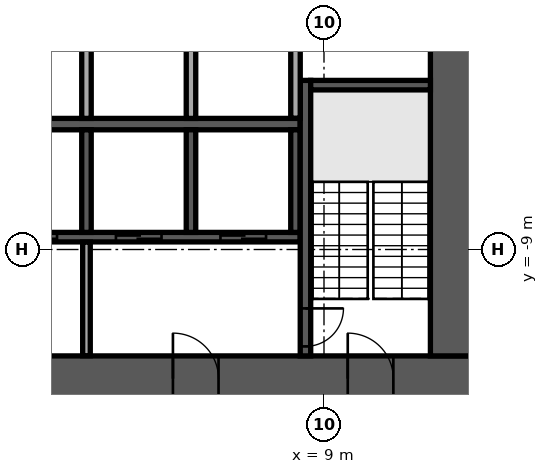
"""IFC4 building model, lengths in metres.
Left out: names, types, materials, properties, quantities, classifications, styles, units other than length and angle.
Written with IfcOpenShell. Run it as: python <this file> out.ifc"""

import sys

from ifc_helpers import new_model, si_unit, direction, frame, frame_2d, origin, place, context, subcontext, project, spatial, rectangle, extrude, element, fill, save


model = new_model("IFC4")
c1 = context("Model", 3, precision=1e-05, world=origin(), true_north=direction((0.0, 1.0)))
c2 = subcontext(c1, "Body", "Model", "MODEL_VIEW")
j1 = project(units=[si_unit("LENGTHUNIT", "METRE"), si_unit("PLANEANGLEUNIT", "RADIAN")], contexts=[c1])
p1 = place(None, origin())
s1 = spatial("IfcSite", under=j1, at=p1, CompositionType="ELEMENT")
p2 = place(p1, origin())
s2 = spatial("IfcBuilding", under=s1, at=p2, CompositionType="ELEMENT")
p3 = place(p2, frame((0.0, 0.0, 51.3)))
s3 = spatial("IfcBuildingStorey", under=s2, at=p3, CompositionType="ELEMENT", Elevation=51.3)
p4 = place(p3, frame((-13.0, -12.4, 0.0), z_axis=(0.0, 0.0, 1.0), x_axis=(1.0, 0.0, 0.0)))
e1 = element("IfcWall", 1, at=p4, inside=s3, PredefinedType="SHEAR", context=c2, shape_type="SweptSolid", body=[
    extrude(rectangle(XDim=26.0, YDim=1.2, at=frame_2d((13.0, 0.0))), origin(), (0.0, 0.0, 1.0), 3.75),
])
p5 = place(p4, frame((7.9, 0.0, 0.0)))
e2 = element("IfcOpeningElement", 2, at=p5, cuts=e1, PredefinedType="OPENING", context=c2, shape_type="SweptSolid", body=[
    extrude(rectangle(XDim=2.0, YDim=2.1, at=frame_2d((1.0, 1.05))), frame((0.0, 0.61, 0.0), z_axis=(0.0, -1.0, 0.0), x_axis=(1.0, 0.0, 0.0)), (0.0, 0.0, 1.0), 1.22),
])
p6 = place(p4, frame((18.025, 0.0, 0.0)))
e3 = element("IfcOpeningElement", 3, at=p6, cuts=e1, PredefinedType="OPENING", context=c2, shape_type="SweptSolid", body=[
    extrude(rectangle(XDim=1.2, YDim=2.1, at=frame_2d((0.6, 1.05))), frame((0.0, 0.61, 0.0), z_axis=(0.0, -1.0, 0.0), x_axis=(1.0, 0.0, 0.0)), (0.0, 0.0, 1.0), 1.22),
])
p7 = place(p4, frame((2.175, 0.0, 0.0)))
e4 = element("IfcOpeningElement", 4, at=p7, cuts=e1, PredefinedType="OPENING", context=c2, shape_type="SweptSolid", body=[
    extrude(rectangle(XDim=1.2, YDim=2.1, at=frame_2d((0.6, 1.05))), frame((0.0, 0.61, 0.0), z_axis=(0.0, -1.0, 0.0), x_axis=(1.0, 0.0, 0.0)), (0.0, 0.0, 1.0), 1.22),
])
p8 = place(p4, frame((22.625, 0.0, 0.0)))
e5 = element("IfcOpeningElement", 5, at=p8, cuts=e1, PredefinedType="OPENING", context=c2, shape_type="SweptSolid", body=[
    extrude(rectangle(XDim=1.2, YDim=2.1, at=frame_2d((0.6, 1.05))), frame((0.0, 0.61, 0.0), z_axis=(0.0, -1.0, 0.0), x_axis=(1.0, 0.0, 0.0)), (0.0, 0.0, 1.0), 1.22),
])
p9 = place(p3, frame((12.4, -11.8, 0.0), z_axis=(0.0, 0.0, 1.0), x_axis=(0.0, 1.0, 0.0)))
e6 = element("IfcWall", 6, at=p9, inside=s3, PredefinedType="SHEAR", context=c2, shape_type="SweptSolid", body=[
    extrude(rectangle(XDim=23.6, YDim=1.2, at=frame_2d((11.8, 0.0))), origin(), (0.0, 0.0, 1.0), 3.75),
])
p10 = place(p9, frame((10.6, 0.0, 0.0)))
e7 = element("IfcOpeningElement", 7, at=p10, cuts=e6, PredefinedType="OPENING", context=c2, shape_type="SweptSolid", body=[
    extrude(rectangle(XDim=2.4, YDim=2.4, at=frame_2d((1.2, 1.2))), frame((0.0, 0.61, 0.0), z_axis=(0.0, -1.0, 0.0), x_axis=(1.0, 0.0, 0.0)), (0.0, 0.0, 1.0), 1.22),
])
p11 = place(p3, frame((-8.375, -5.7, 0.0), z_axis=(0.0, 0.0, 1.0), x_axis=(1.0, 0.0, 0.0)))
e8 = element("IfcWall", 8, at=p11, inside=s3, PredefinedType="SOLIDWALL", context=c2, shape_type="SweptSolid", body=[
    extrude(rectangle(XDim=16.75, YDim=0.3, at=frame_2d((8.375, 0.0))), origin(), (0.0, 0.0, 1.0), 3.75),
])
for number, where, z_axis, x_axis in (
    (9, (2.75, -5.55, 0.0), (0.0, 0.0, 1.0), (0.0, 1.0, 0.0)),
    (10, (5.5, -5.55, 0.0), (0.0, 0.0, 1.0), (0.0, 1.0, 0.0)),
):
    element("IfcWall", number, at=place(p3, frame(where, z_axis=z_axis, x_axis=x_axis)), inside=s3, PredefinedType="SOLIDWALL", context=c2, shape_type="SweptSolid", body=[
        extrude(rectangle(XDim=2.7, YDim=0.25, at=frame_2d((1.35, 0.0))), origin(), (0.0, 0.0, 1.0), 3.75),
    ])
p12 = place(p3, frame((-2.875, -8.675, 0.0), z_axis=(0.0, 0.0, 1.0), x_axis=(1.0, 0.0, 0.0)))
e11 = element("IfcWall", 11, at=p12, inside=s3, PredefinedType="SOLIDWALL", context=c2, shape_type="SweptSolid", body=[
    extrude(rectangle(XDim=11.25, YDim=0.25, at=frame_2d((5.625, 0.0))), origin(), (0.0, 0.0, 1.0), 3.75),
])
p13 = place(p12, frame((0.9, 0.0, 0.0)))
e12 = element("IfcOpeningElement", 12, at=p13, cuts=e11, PredefinedType="OPENING", context=c2, shape_type="SweptSolid", body=[
    extrude(rectangle(XDim=1.2, YDim=2.1, at=frame_2d((0.6, 1.05))), frame((0.0, 0.135, 0.0), z_axis=(0.0, -1.0, 0.0), x_axis=(1.0, 0.0, 0.0)), (0.0, 0.0, 1.0), 0.27),
])
p14 = place(p12, frame((3.65, 0.0, 0.0)))
e13 = element("IfcOpeningElement", 13, at=p14, cuts=e11, PredefinedType="OPENING", context=c2, shape_type="SweptSolid", body=[
    extrude(rectangle(XDim=1.2, YDim=2.1, at=frame_2d((0.6, 1.05))), frame((0.0, 0.135, 0.0), z_axis=(0.0, -1.0, 0.0), x_axis=(1.0, 0.0, 0.0)), (0.0, 0.0, 1.0), 0.27),
])
p15 = place(p12, frame((6.4, 0.0, 0.0)))
e14 = element("IfcOpeningElement", 14, at=p15, cuts=e11, PredefinedType="OPENING", context=c2, shape_type="SweptSolid", body=[
    extrude(rectangle(XDim=1.2, YDim=2.1, at=frame_2d((0.6, 1.05))), frame((0.0, 0.135, 0.0), z_axis=(0.0, -1.0, 0.0), x_axis=(1.0, 0.0, 0.0)), (0.0, 0.0, 1.0), 0.27),
])
p16 = place(p12, frame((9.15, 0.0, 0.0)))
e15 = element("IfcOpeningElement", 15, at=p16, cuts=e11, PredefinedType="OPENING", context=c2, shape_type="SweptSolid", body=[
    extrude(rectangle(XDim=1.2, YDim=2.1, at=frame_2d((0.6, 1.05))), frame((0.0, 0.135, 0.0), z_axis=(0.0, -1.0, 0.0), x_axis=(1.0, 0.0, 0.0)), (0.0, 0.0, 1.0), 0.27),
])
for number, where, z_axis, x_axis in (
    (16, (2.75, -8.55, 0.0), (0.0, 0.0, 1.0), (0.0, 1.0, 0.0)),
    (17, (5.5, -8.55, 0.0), (0.0, 0.0, 1.0), (0.0, 1.0, 0.0)),
    (18, (8.25, -8.55, 0.0), (0.0, 0.0, 1.0), (0.0, 1.0, 0.0)),
):
    element("IfcWall", number, at=place(p3, frame(where, z_axis=z_axis, x_axis=x_axis)), inside=s3, PredefinedType="SOLIDWALL", context=c2, shape_type="SweptSolid", body=[
        extrude(rectangle(XDim=2.7, YDim=0.25, at=frame_2d((1.35, 0.0))), origin(), (0.0, 0.0, 1.0), 3.75),
    ])
p17 = place(p3, frame((8.512, -4.55, 0.0), z_axis=(0.0, 0.0, 1.0), x_axis=(0.0, -1.0, 0.0)))
e19 = element("IfcWall", 19, at=p17, inside=s3, PredefinedType="SOLIDWALL", context=c2, shape_type="SweptSolid", body=[
    extrude(rectangle(XDim=7.25, YDim=0.275, at=frame_2d((3.625, 0.0))), origin(), (0.0, 0.0, 1.0), 3.75),
])
p18 = place(p17, frame((6.0, 0.0, 0.0)))
e20 = element("IfcOpeningElement", 20, at=p18, cuts=e19, PredefinedType="OPENING", context=c2, shape_type="SweptSolid", body=[
    extrude(rectangle(XDim=1.0, YDim=2.1, at=frame_2d((0.5, 1.05))), frame((0.0, 0.147, 0.0), z_axis=(0.0, -1.0, 0.0), x_axis=(1.0, 0.0, 0.0)), (0.0, 0.0, 1.0), 0.295),
])
p19 = place(p3, frame((8.65, -4.675, 0.0), z_axis=(0.0, 0.0, 1.0), x_axis=(1.0, 0.0, 0.0)))
e21 = element("IfcWall", 21, at=p19, inside=s3, PredefinedType="SOLIDWALL", context=c2, shape_type="SweptSolid", body=[
    extrude(rectangle(XDim=3.15, YDim=0.25, at=frame_2d((1.575, 0.0))), origin(), (0.0, 0.0, 1.0), 3.75),
])
p20 = place(p3, frame((2.75, -11.795, 0.0), z_axis=(0.0, 0.0, 1.0), x_axis=(0.0, 1.0, 0.0)))
e22 = element("IfcWall", 22, at=p20, inside=s3, PredefinedType="PARTITIONING", context=c2, shape_type="SweptSolid", body=[
    extrude(rectangle(XDim=2.99, YDim=0.2, at=frame_2d((1.495, 0.0))), origin(), (0.0, 0.0, 1.0), 3.75),
])
p21 = place(p3, frame((8.25, -5.545, 0.0), z_axis=(0.0, 0.0, 1.0), x_axis=(0.0, 1.0, 0.0)))
e23 = element("IfcWall", 23, at=p21, inside=s3, PredefinedType="PARTITIONING", context=c2, shape_type="SweptSolid", body=[
    extrude(rectangle(XDim=2.69, YDim=0.25, at=frame_2d((1.345, 0.0))), origin(), (0.0, 0.0, 1.0), 3.75),
])
p22 = place(p6, origin())
e24 = element("IfcDoor", 24, at=p22, inside=s3, OperationType="SINGLE_SWING_LEFT", PredefinedType="DOOR", context=c2, shape_type="SweptSolid", body=[
    extrude(rectangle(XDim=1.2, YDim=2.1, at=frame_2d((0.6, 1.05))), frame((0.0, 0.025, 0.0), z_axis=(0.0, -1.0, 0.0), x_axis=(1.0, 0.0, 0.0)), (0.0, 0.0, 1.0), 0.05),
])
fill(e3, e24)
p23 = place(p8, origin())
e25 = element("IfcDoor", 25, at=p23, inside=s3, OperationType="SINGLE_SWING_LEFT", PredefinedType="DOOR", context=c2, shape_type="SweptSolid", body=[
    extrude(rectangle(XDim=1.2, YDim=2.1, at=frame_2d((0.6, 1.05))), frame((0.0, 0.025, 0.0), z_axis=(0.0, -1.0, 0.0), x_axis=(1.0, 0.0, 0.0)), (0.0, 0.0, 1.0), 0.05),
])
fill(e5, e25)
p24 = place(p14, origin())
e26 = element("IfcDoor", 26, at=p24, inside=s3, OperationType="DOUBLE_DOOR_SLIDING", PredefinedType="DOOR", context=c2, shape_type="SweptSolid", body=[
    extrude(rectangle(XDim=1.2, YDim=2.1, at=frame_2d((0.6, 1.05))), frame((0.0, 0.025, 0.0), z_axis=(0.0, -1.0, 0.0), x_axis=(1.0, 0.0, 0.0)), (0.0, 0.0, 1.0), 0.05),
])
fill(e13, e26)
p25 = place(p15, origin())
e27 = element("IfcDoor", 27, at=p25, inside=s3, OperationType="DOUBLE_DOOR_SLIDING", PredefinedType="DOOR", context=c2, shape_type="SweptSolid", body=[
    extrude(rectangle(XDim=1.2, YDim=2.1, at=frame_2d((0.6, 1.05))), frame((0.0, 0.025, 0.0), z_axis=(0.0, -1.0, 0.0), x_axis=(1.0, 0.0, 0.0)), (0.0, 0.0, 1.0), 0.05),
])
fill(e14, e27)
p26 = place(p16, origin())
e28 = element("IfcDoor", 28, at=p26, inside=s3, OperationType="DOUBLE_DOOR_SLIDING", PredefinedType="DOOR", context=c2, shape_type="SweptSolid", body=[
    extrude(rectangle(XDim=1.2, YDim=2.1, at=frame_2d((0.6, 1.05))), frame((0.0, 0.025, 0.0), z_axis=(0.0, -1.0, 0.0), x_axis=(1.0, 0.0, 0.0)), (0.0, 0.0, 1.0), 0.05),
])
fill(e15, e28)
p27 = place(p18, origin())
e29 = element("IfcDoor", 29, at=p27, inside=s3, OperationType="SINGLE_SWING_LEFT", PredefinedType="DOOR", context=c2, shape_type="SweptSolid", body=[
    extrude(rectangle(XDim=1.0, YDim=2.1, at=frame_2d((0.5, 1.05))), frame((0.0, 0.025, 0.0), z_axis=(0.0, -1.0, 0.0), x_axis=(1.0, 0.0, 0.0)), (0.0, 0.0, 1.0), 0.05),
])
fill(e20, e29)
save(model, sys.argv[1])
